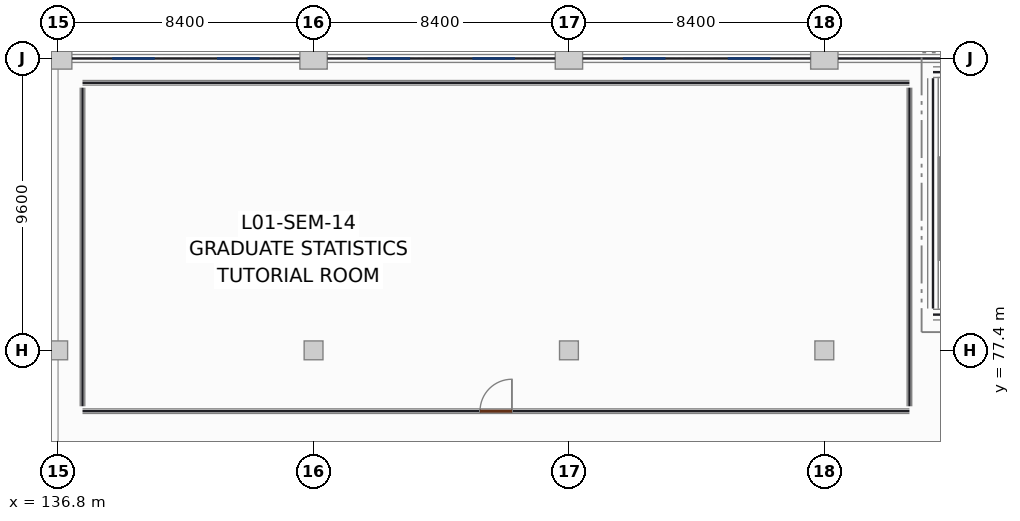
"""IFC4 building model, lengths in metres.
Left out: names, types, materials, properties, quantities, classifications, styles, units other than length and angle.
Written with IfcOpenShell. Run it as: python <this file> out.ifc"""

import sys

from ifc_helpers import new_model, si_unit, direction, frame, frame_2d, origin, origin_2d, place, context, subcontext, project, spatial, rectangle, extrude, element, fill, save


model = new_model("IFC4")
c1 = context("Model", 3, precision=1e-05, world=origin(), true_north=direction((0.0, 1.0)))
c2 = subcontext(c1, "Body", "Model", "MODEL_VIEW")
j1 = project(units=[si_unit("LENGTHUNIT", "METRE"), si_unit("PLANEANGLEUNIT", "RADIAN")], contexts=[c1])
p1 = place(None, origin())
s1 = spatial("IfcSite", under=j1, at=p1, CompositionType="ELEMENT")
p2 = place(p1, origin())
s2 = spatial("IfcBuilding", under=s1, at=p2, CompositionType="ELEMENT")
p3 = place(p2, frame((0.0, 0.0, 5.4)))
s3 = spatial("IfcBuildingStorey", under=s2, at=p3, CompositionType="ELEMENT", Elevation=5.4)
p4 = place(p3, frame((136.8, 77.4, 0.0), z_axis=(0.0, 0.0, 1.0), x_axis=(1.0, 0.0, 0.0)))
e1 = element("IfcColumn", 1, at=p4, inside=s3, PredefinedType="COLUMN", context=c2, shape_type="SweptSolid", body=[
    extrude(rectangle(XDim=0.62, YDim=0.62, at=origin_2d()), origin(), (0.0, 0.0, 1.0), 4.18),
])
p5 = place(p3, frame((136.8, 87.0, 0.0), z_axis=(0.0, 0.0, 1.0), x_axis=(1.0, 0.0, 0.0)))
e2 = element("IfcColumn", 2, at=p5, inside=s3, PredefinedType="COLUMN", context=c2, shape_type="SweptSolid", body=[
    extrude(rectangle(XDim=0.9, YDim=0.7, at=origin_2d()), origin(), (0.0, 0.0, 1.0), 4.18),
])
p6 = place(p3, frame((145.2, 77.4, 0.0), z_axis=(0.0, 0.0, 1.0), x_axis=(1.0, 0.0, 0.0)))
e3 = element("IfcColumn", 3, at=p6, inside=s3, PredefinedType="COLUMN", context=c2, shape_type="SweptSolid", body=[
    extrude(rectangle(XDim=0.62, YDim=0.62, at=origin_2d()), origin(), (0.0, 0.0, 1.0), 4.18),
])
p7 = place(p3, frame((145.2, 87.0, 0.0), z_axis=(0.0, 0.0, 1.0), x_axis=(1.0, 0.0, 0.0)))
e4 = element("IfcColumn", 4, at=p7, inside=s3, PredefinedType="COLUMN", context=c2, shape_type="SweptSolid", body=[
    extrude(rectangle(XDim=0.9, YDim=0.7, at=origin_2d()), origin(), (0.0, 0.0, 1.0), 4.18),
])
p8 = place(p3, frame((153.6, 77.4, 0.0), z_axis=(0.0, 0.0, 1.0), x_axis=(1.0, 0.0, 0.0)))
e5 = element("IfcColumn", 5, at=p8, inside=s3, PredefinedType="COLUMN", context=c2, shape_type="SweptSolid", body=[
    extrude(rectangle(XDim=0.62, YDim=0.62, at=origin_2d()), origin(), (0.0, 0.0, 1.0), 4.18),
])
p9 = place(p3, frame((153.6, 87.0, 0.0), z_axis=(0.0, 0.0, 1.0), x_axis=(1.0, 0.0, 0.0)))
e6 = element("IfcColumn", 6, at=p9, inside=s3, PredefinedType="COLUMN", context=c2, shape_type="SweptSolid", body=[
    extrude(rectangle(XDim=0.9, YDim=0.7, at=origin_2d()), origin(), (0.0, 0.0, 1.0), 4.18),
])
p10 = place(p3, frame((162.0, 77.4, 0.0), z_axis=(0.0, 0.0, 1.0), x_axis=(1.0, 0.0, 0.0)))
e7 = element("IfcColumn", 7, at=p10, inside=s3, PredefinedType="COLUMN", context=c2, shape_type="SweptSolid", body=[
    extrude(rectangle(XDim=0.62, YDim=0.62, at=origin_2d()), origin(), (0.0, 0.0, 1.0), 4.18),
])
p11 = place(p3, frame((162.0, 87.0, 0.0), z_axis=(0.0, 0.0, 1.0), x_axis=(1.0, 0.0, 0.0)))
e8 = element("IfcColumn", 8, at=p11, inside=s3, PredefinedType="COLUMN", context=c2, shape_type="SweptSolid", body=[
    extrude(rectangle(XDim=0.9, YDim=0.7, at=origin_2d()), origin(), (0.0, 0.0, 1.0), 4.18),
])
p12 = place(p3, frame((137.252, 87.0, 0.0), z_axis=(0.0, 0.0, 1.0), x_axis=(1.0, 0.0, 0.0)))
e9 = element("IfcWall", 9, at=p12, inside=s3, PredefinedType="SOLIDWALL", context=c2, shape_type="SweptSolid", body=[
    extrude(rectangle(XDim=7.496, YDim=0.26, at=frame_2d((3.748, 0.0))), origin(), (0.0, 0.0, 1.0), 3.38),
])
p13 = place(p12, frame((1.324, 0.0, 0.85)))
e10 = element("IfcOpeningElement", 10, at=p13, cuts=e9, PredefinedType="OPENING", context=c2, shape_type="SweptSolid", body=[
    extrude(rectangle(XDim=1.4, YDim=1.65, at=frame_2d((0.7, 0.825))), frame((0.0, 0.14, 0.0), z_axis=(0.0, -1.0, 0.0), x_axis=(1.0, 0.0, 0.0)), (0.0, 0.0, 1.0), 0.28),
])
p14 = place(p12, frame((4.772, 0.0, 0.85)))
e11 = element("IfcOpeningElement", 11, at=p14, cuts=e9, PredefinedType="OPENING", context=c2, shape_type="SweptSolid", body=[
    extrude(rectangle(XDim=1.4, YDim=1.65, at=frame_2d((0.7, 0.825))), frame((0.0, 0.14, 0.0), z_axis=(0.0, -1.0, 0.0), x_axis=(1.0, 0.0, 0.0)), (0.0, 0.0, 1.0), 0.28),
])
p15 = place(p3, frame((145.652, 87.0, 0.0), z_axis=(0.0, 0.0, 1.0), x_axis=(1.0, 0.0, 0.0)))
e12 = element("IfcWall", 12, at=p15, inside=s3, PredefinedType="SOLIDWALL", context=c2, shape_type="SweptSolid", body=[
    extrude(rectangle(XDim=7.496, YDim=0.26, at=frame_2d((3.748, 0.0))), origin(), (0.0, 0.0, 1.0), 3.38),
])
p16 = place(p15, frame((1.324, 0.0, 0.85)))
e13 = element("IfcOpeningElement", 13, at=p16, cuts=e12, PredefinedType="OPENING", context=c2, shape_type="SweptSolid", body=[
    extrude(rectangle(XDim=1.4, YDim=1.65, at=frame_2d((0.7, 0.825))), frame((0.0, 0.14, 0.0), z_axis=(0.0, -1.0, 0.0), x_axis=(1.0, 0.0, 0.0)), (0.0, 0.0, 1.0), 0.28),
])
p17 = place(p15, frame((4.772, 0.0, 0.85)))
e14 = element("IfcOpeningElement", 14, at=p17, cuts=e12, PredefinedType="OPENING", context=c2, shape_type="SweptSolid", body=[
    extrude(rectangle(XDim=1.4, YDim=1.65, at=frame_2d((0.7, 0.825))), frame((0.0, 0.14, 0.0), z_axis=(0.0, -1.0, 0.0), x_axis=(1.0, 0.0, 0.0)), (0.0, 0.0, 1.0), 0.28),
])
p18 = place(p3, frame((154.052, 87.0, 0.0), z_axis=(0.0, 0.0, 1.0), x_axis=(1.0, 0.0, 0.0)))
e15 = element("IfcWall", 15, at=p18, inside=s3, PredefinedType="SOLIDWALL", context=c2, shape_type="SweptSolid", body=[
    extrude(rectangle(XDim=7.496, YDim=0.26, at=frame_2d((3.748, 0.0))), origin(), (0.0, 0.0, 1.0), 3.38),
])
p19 = place(p18, frame((1.324, 0.0, 0.85)))
e16 = element("IfcOpeningElement", 16, at=p19, cuts=e15, PredefinedType="OPENING", context=c2, shape_type="SweptSolid", body=[
    extrude(rectangle(XDim=1.4, YDim=1.65, at=frame_2d((0.7, 0.825))), frame((0.0, 0.14, 0.0), z_axis=(0.0, -1.0, 0.0), x_axis=(1.0, 0.0, 0.0)), (0.0, 0.0, 1.0), 0.28),
])
p20 = place(p18, frame((4.772, 0.0, 0.85)))
e17 = element("IfcOpeningElement", 17, at=p20, cuts=e15, PredefinedType="OPENING", context=c2, shape_type="SweptSolid", body=[
    extrude(rectangle(XDim=1.4, YDim=1.65, at=frame_2d((0.7, 0.825))), frame((0.0, 0.14, 0.0), z_axis=(0.0, -1.0, 0.0), x_axis=(1.0, 0.0, 0.0)), (0.0, 0.0, 1.0), 0.28),
])
p21 = place(p3, frame((162.452, 87.0, 0.0), z_axis=(0.0, 0.0, 1.0), x_axis=(1.0, 0.0, 0.0)))
e18 = element("IfcWall", 18, at=p21, inside=s3, PredefinedType="SOLIDWALL", context=c2, shape_type="SweptSolid", body=[
    extrude(rectangle(XDim=7.496, YDim=0.26, at=frame_2d((3.748, 0.0))), origin(), (0.0, 0.0, 1.0), 3.38),
])
p22 = place(p21, frame((4.772, 0.0, 0.85)))
e19 = element("IfcOpeningElement", 19, at=p22, cuts=e18, PredefinedType="OPENING", context=c2, shape_type="SweptSolid", body=[
    extrude(rectangle(XDim=1.4, YDim=1.65, at=frame_2d((0.7, 0.825))), frame((0.0, 0.14, 0.0), z_axis=(0.0, -1.0, 0.0), x_axis=(1.0, 0.0, 0.0)), (0.0, 0.0, 1.0), 0.28),
])
p23 = place(p3, frame((165.575, 78.575, 0.0), z_axis=(0.0, 0.0, 1.0), x_axis=(1.0, 0.0, 0.0)))
e20 = element("IfcWall", 20, at=p23, inside=s3, PredefinedType="SHEAR", context=c2, shape_type="SweptSolid", body=[
    extrude(rectangle(XDim=3.6, YDim=0.35, at=frame_2d((1.8, 0.0))), origin(), (0.0, 0.0, 1.0), 4.18),
])
p24 = place(p23, frame((1.1, 0.0, 0.0)))
e21 = element("IfcOpeningElement", 21, at=p24, cuts=e20, PredefinedType="OPENING", context=c2, shape_type="SweptSolid", body=[
    extrude(rectangle(XDim=1.2, YDim=2.2, at=frame_2d((0.6, 1.1))), frame((0.0, 0.185, 0.0), z_axis=(0.0, -1.0, 0.0), x_axis=(1.0, 0.0, 0.0)), (0.0, 0.0, 1.0), 0.37),
])
p25 = place(p3, frame((165.575, 78.775, 0.0), z_axis=(0.0, 0.0, 1.0), x_axis=(0.0, 1.0, 0.0)))
e22 = element("IfcWall", 22, at=p25, inside=s3, PredefinedType="SHEAR", context=c2, shape_type="SweptSolid", body=[
    extrude(rectangle(XDim=7.575, YDim=0.35, at=frame_2d((3.788, 0.0))), origin(), (0.0, 0.0, 1.0), 4.18),
])
p26 = place(p3, frame((165.575, 86.55, 0.0), z_axis=(0.0, 0.0, 1.0), x_axis=(1.0, 0.0, 0.0)))
e23 = element("IfcWall", 23, at=p26, inside=s3, PredefinedType="SHEAR", context=c2, shape_type="SweptSolid", body=[
    extrude(rectangle(XDim=3.6, YDim=0.35, at=frame_2d((1.8, 0.0))), origin(), (0.0, 0.0, 1.0), 4.18),
])
p27 = place(p3, frame((137.6, 75.4, 0.0), z_axis=(0.0, 0.0, 1.0), x_axis=(1.0, 0.0, 0.0)))
e24 = element("IfcWall", 24, at=p27, inside=s3, PredefinedType="PARTITIONING", context=c2, shape_type="SweptSolid", body=[
    extrude(rectangle(XDim=27.2, YDim=0.15, at=frame_2d((13.6, 0.0))), origin(), (0.0, 0.0, 1.0), 3.22),
])
p28 = place(p27, frame((13.075, 0.0, 0.0)))
e25 = element("IfcOpeningElement", 25, at=p28, cuts=e24, PredefinedType="OPENING", context=c2, shape_type="SweptSolid", body=[
    extrude(rectangle(XDim=1.05, YDim=2.2, at=frame_2d((0.525, 1.1))), frame((0.0, 0.085, 0.0), z_axis=(0.0, -1.0, 0.0), x_axis=(1.0, 0.0, 0.0)), (0.0, 0.0, 1.0), 0.17),
])
p29 = place(p3, frame((137.6, 86.2, 0.0), z_axis=(0.0, 0.0, 1.0), x_axis=(1.0, 0.0, 0.0)))
e26 = element("IfcWall", 26, at=p29, inside=s3, PredefinedType="PARTITIONING", context=c2, shape_type="SweptSolid", body=[
    extrude(rectangle(XDim=27.2, YDim=0.15, at=frame_2d((13.6, 0.0))), origin(), (0.0, 0.0, 1.0), 3.22),
])
for number, where, z_axis, x_axis in (
    (27, (137.6, 75.56, 0.0), (0.0, 0.0, 1.0), (0.0, 1.0, 0.0)),
    (28, (164.8, 75.56, 0.0), (0.0, 0.0, 1.0), (0.0, 1.0, 0.0)),
):
    element("IfcWall", number, at=place(p3, frame(where, z_axis=z_axis, x_axis=x_axis)), inside=s3, PredefinedType="PARTITIONING", context=c2, shape_type="SweptSolid", body=[
        extrude(rectangle(XDim=10.48, YDim=0.15, at=frame_2d((5.24, 0.0))), origin(), (0.0, 0.0, 1.0), 3.22),
    ])
p30 = place(p13, origin())
e29 = element("IfcWindow", 29, at=p30, inside=s3, PartitioningType="SINGLE_PANEL", PredefinedType="WINDOW", context=c2, shape_type="SweptSolid", body=[
    extrude(rectangle(XDim=1.4, YDim=1.65, at=frame_2d((0.7, 0.825))), frame((0.0, 0.03, 0.0), z_axis=(0.0, -1.0, 0.0), x_axis=(1.0, 0.0, 0.0)), (0.0, 0.0, 1.0), 0.06),
])
fill(e10, e29)
p31 = place(p14, origin())
e30 = element("IfcWindow", 30, at=p31, inside=s3, PartitioningType="SINGLE_PANEL", PredefinedType="WINDOW", context=c2, shape_type="SweptSolid", body=[
    extrude(rectangle(XDim=1.4, YDim=1.65, at=frame_2d((0.7, 0.825))), frame((0.0, 0.03, 0.0), z_axis=(0.0, -1.0, 0.0), x_axis=(1.0, 0.0, 0.0)), (0.0, 0.0, 1.0), 0.06),
])
fill(e11, e30)
p32 = place(p16, origin())
e31 = element("IfcWindow", 31, at=p32, inside=s3, PartitioningType="SINGLE_PANEL", PredefinedType="WINDOW", context=c2, shape_type="SweptSolid", body=[
    extrude(rectangle(XDim=1.4, YDim=1.65, at=frame_2d((0.7, 0.825))), frame((0.0, 0.03, 0.0), z_axis=(0.0, -1.0, 0.0), x_axis=(1.0, 0.0, 0.0)), (0.0, 0.0, 1.0), 0.06),
])
fill(e13, e31)
p33 = place(p17, origin())
e32 = element("IfcWindow", 32, at=p33, inside=s3, PartitioningType="SINGLE_PANEL", PredefinedType="WINDOW", context=c2, shape_type="SweptSolid", body=[
    extrude(rectangle(XDim=1.4, YDim=1.65, at=frame_2d((0.7, 0.825))), frame((0.0, 0.03, 0.0), z_axis=(0.0, -1.0, 0.0), x_axis=(1.0, 0.0, 0.0)), (0.0, 0.0, 1.0), 0.06),
])
fill(e14, e32)
p34 = place(p19, origin())
e33 = element("IfcWindow", 33, at=p34, inside=s3, PartitioningType="SINGLE_PANEL", PredefinedType="WINDOW", context=c2, shape_type="SweptSolid", body=[
    extrude(rectangle(XDim=1.4, YDim=1.65, at=frame_2d((0.7, 0.825))), frame((0.0, 0.03, 0.0), z_axis=(0.0, -1.0, 0.0), x_axis=(1.0, 0.0, 0.0)), (0.0, 0.0, 1.0), 0.06),
])
fill(e16, e33)
p35 = place(p20, origin())
e34 = element("IfcWindow", 34, at=p35, inside=s3, PartitioningType="SINGLE_PANEL", PredefinedType="WINDOW", context=c2, shape_type="SweptSolid", body=[
    extrude(rectangle(XDim=1.4, YDim=1.65, at=frame_2d((0.7, 0.825))), frame((0.0, 0.03, 0.0), z_axis=(0.0, -1.0, 0.0), x_axis=(1.0, 0.0, 0.0)), (0.0, 0.0, 1.0), 0.06),
])
fill(e17, e34)
p36 = place(p28, origin())
e35 = element("IfcDoor", 35, at=p36, inside=s3, OperationType="SINGLE_SWING_RIGHT", PredefinedType="DOOR", context=c2, shape_type="SweptSolid", body=[
    extrude(rectangle(XDim=1.05, YDim=2.2, at=frame_2d((0.525, 1.1))), frame((0.0, 0.025, 0.0), z_axis=(0.0, -1.0, 0.0), x_axis=(1.0, 0.0, 0.0)), (0.0, 0.0, 1.0), 0.05),
])
fill(e25, e35)
save(model, sys.argv[1])
